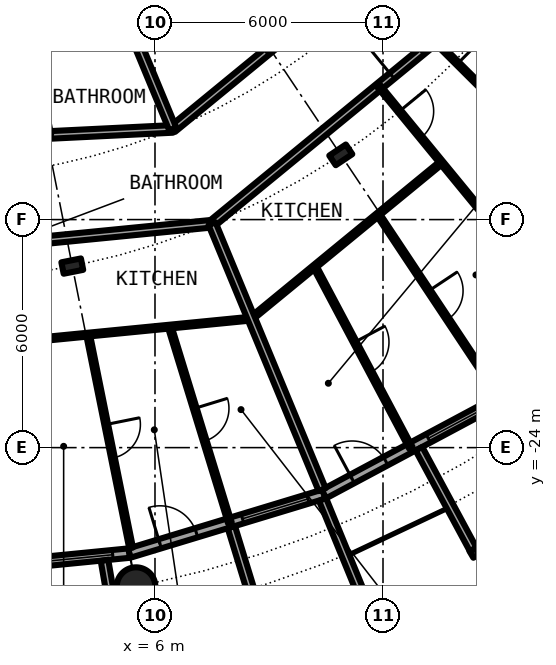
"""IFC4 building model, lengths in metres.
Left out: names, types, materials, properties, quantities, classifications, styles, units other than length and angle.
Written with IfcOpenShell. Run it as: python <this file> out.ifc"""

import sys

from ifc_helpers import new_model, si_unit, direction, frame, frame_2d, origin, origin_2d, place, context, subcontext, project, spatial, rectangle, circle, hollow_circle, i_section, extrude, element, fill, save


model = new_model("IFC4")
c1 = context("Model", 3, precision=1e-05, world=origin(), true_north=direction((0.0, 1.0)))
c2 = subcontext(c1, "Body", "Model", "MODEL_VIEW")
j1 = project(units=[si_unit("LENGTHUNIT", "METRE"), si_unit("PLANEANGLEUNIT", "RADIAN")], contexts=[c1])
p1 = place(None, origin())
s1 = spatial("IfcSite", under=j1, at=p1, CompositionType="ELEMENT")
p2 = place(p1, origin())
s2 = spatial("IfcBuilding", under=s1, at=p2, CompositionType="ELEMENT")
p3 = place(p2, frame((0.0, 0.0, 63.6)))
s3 = spatial("IfcBuildingStorey", under=s2, at=p3, CompositionType="ELEMENT", Elevation=63.6)
p4 = place(p3, frame((5.501, -27.658, 0.0), z_axis=(0.0, 0.0, 1.0), x_axis=(1.0, 0.0, 0.0)))
e1 = element("IfcColumn", 1, at=p4, inside=s3, PredefinedType="COLUMN", context=c2, shape_type="SweptSolid", body=[
    extrude(hollow_circle(Radius=0.508, WallThickness=0.04, at=origin_2d()), origin(), (0.0, 0.0, 1.0), 3.05),
])
for number, where, z_axis, x_axis in (
    (2, (3.824, -19.223, 0.0), (0.0, 0.0, 1.0), (0.195, -0.981, 0.0)),
    (3, (10.889, -16.297, 0.0), (0.0, 0.0, 1.0), (0.556, -0.831, 0.0)),
):
    element("IfcColumn", number, at=place(p3, frame(where, z_axis=z_axis, x_axis=x_axis)), inside=s3, PredefinedType="COLUMN", context=c2, shape_type="SweptSolid", body=[
        extrude(i_section(OverallWidth=0.306, OverallDepth=0.524, WebThickness=0.021, FlangeThickness=0.04, FilletRadius=0.027, at=origin_2d()), origin(), (0.0, 0.0, 1.0), 3.05),
    ])
p5 = place(p3, frame((0.0, -27.3, 0.0), z_axis=(0.0, 0.0, 1.0), x_axis=(0.995173996315, 0.098126026407, 0.0)))
e4 = element("IfcWall", 4, at=p5, inside=s3, PredefinedType="SOLIDWALL", context=c2, shape_type="SweptSolid", body=[
    extrude(rectangle(XDim=5.352, YDim=0.25, at=frame_2d((2.676, 0.0))), origin(), (0.0, 0.0, 1.0), 2.7),
])
p6 = place(p5, frame((0.841, 0.0, 0.0)))
e5 = element("IfcOpeningElement", 5, at=p6, cuts=e4, PredefinedType="OPENING", context=c2, shape_type="SweptSolid", body=[
    extrude(rectangle(XDim=1.0, YDim=2.2, at=frame_2d((0.5, 1.1))), frame((0.0, 0.135, 0.0), z_axis=(0.0, -1.0, 0.0), x_axis=(1.0, 0.0, 0.0)), (0.0, 0.0, 1.0), 0.27),
])
p7 = place(p5, frame((3.111, 0.0, 0.3)))
e6 = element("IfcOpeningElement", 6, at=p7, cuts=e4, PredefinedType="OPENING", context=c2, shape_type="SweptSolid", body=[
    extrude(rectangle(XDim=1.8, YDim=2.1, at=frame_2d((0.9, 1.05))), frame((0.0, 0.135, 0.0), z_axis=(0.0, -1.0, 0.0), x_axis=(1.0, 0.0, 0.0)), (0.0, 0.0, 1.0), 0.27),
])
p8 = place(p3, frame((4.671, -26.966, -0.03), z_axis=(0.0, 0.0, 1.0), x_axis=(0.170539878907, -0.985350774954, 0.0)))
e7 = element("IfcWall", 7, at=p8, inside=s3, PredefinedType="SOLIDWALL", context=c2, shape_type="SweptSolid", body=[
    extrude(rectangle(XDim=2.932, YDim=0.2, at=frame_2d((1.466, 0.0))), origin(), (0.0, 0.0, 1.0), 2.73),
])
p9 = place(p3, frame((5.326, -26.775, 0.0), z_axis=(0.0, 0.0, 1.0), x_axis=(0.956965678721, 0.290201119486, 0.0)))
e8 = element("IfcWall", 8, at=p9, inside=s3, PredefinedType="SOLIDWALL", context=c2, shape_type="SweptSolid", body=[
    extrude(rectangle(XDim=5.351, YDim=0.25, at=frame_2d((2.676, 0.0))), origin(), (0.0, 0.0, 1.0), 2.7),
])
p10 = place(p9, frame((0.841, 0.0, 0.0)))
e9 = element("IfcOpeningElement", 9, at=p10, cuts=e8, PredefinedType="OPENING", context=c2, shape_type="SweptSolid", body=[
    extrude(rectangle(XDim=1.0, YDim=2.2, at=frame_2d((0.5, 1.1))), frame((0.0, 0.135, 0.0), z_axis=(0.0, -1.0, 0.0), x_axis=(1.0, 0.0, 0.0)), (0.0, 0.0, 1.0), 0.27),
])
p11 = place(p9, frame((3.111, 0.0, 0.3)))
e10 = element("IfcOpeningElement", 10, at=p11, cuts=e8, PredefinedType="OPENING", context=c2, shape_type="SweptSolid", body=[
    extrude(rectangle(XDim=1.8, YDim=2.1, at=frame_2d((0.9, 1.05))), frame((0.0, 0.135, 0.0), z_axis=(0.0, -1.0, 0.0), x_axis=(1.0, 0.0, 0.0)), (0.0, 0.0, 1.0), 0.27),
])
p12 = place(p3, frame((8.009, -26.092, -0.03), z_axis=(0.0, 0.0, 1.0), x_axis=(0.293406695073, -0.955987715029, 0.0)))
e11 = element("IfcWall", 11, at=p12, inside=s3, PredefinedType="SOLIDWALL", context=c2, shape_type="SweptSolid", body=[
    extrude(rectangle(XDim=3.006, YDim=0.2, at=frame_2d((1.503, 0.0))), origin(), (0.0, 0.0, 1.0), 2.73),
])
p13 = place(p3, frame((10.409, -25.364, -0.03), z_axis=(0.0, 0.0, 1.0), x_axis=(0.379509886562, -0.925187681501, 0.0)))
e12 = element("IfcWall", 12, at=p13, inside=s3, PredefinedType="SOLIDWALL", context=c2, shape_type="SweptSolid", body=[
    extrude(rectangle(XDim=2.883, YDim=0.2, at=frame_2d((1.441, 0.0))), origin(), (0.0, 0.0, 1.0), 2.73),
])
p14 = place(p3, frame((10.447, -25.222, 0.0), z_axis=(0.0, 0.0, 1.0), x_axis=(0.881915646801, 0.471407246368, 0.0)))
e13 = element("IfcWall", 13, at=p14, inside=s3, PredefinedType="SOLIDWALL", context=c2, shape_type="SweptSolid", body=[
    extrude(rectangle(XDim=5.352, YDim=0.25, at=frame_2d((2.676, 0.0))), origin(), (0.0, 0.0, 1.0), 2.7),
])
p15 = place(p14, frame((0.841, 0.0, 0.0)))
e14 = element("IfcOpeningElement", 14, at=p15, cuts=e13, PredefinedType="OPENING", context=c2, shape_type="SweptSolid", body=[
    extrude(rectangle(XDim=1.0, YDim=2.2, at=frame_2d((0.5, 1.1))), frame((0.0, 0.135, 0.0), z_axis=(0.0, -1.0, 0.0), x_axis=(1.0, 0.0, 0.0)), (0.0, 0.0, 1.0), 0.27),
])
p16 = place(p14, frame((3.111, 0.0, 0.3)))
e15 = element("IfcOpeningElement", 15, at=p16, cuts=e13, PredefinedType="OPENING", context=c2, shape_type="SweptSolid", body=[
    extrude(rectangle(XDim=1.8, YDim=2.1, at=frame_2d((0.9, 1.05))), frame((0.0, 0.135, 0.0), z_axis=(0.0, -1.0, 0.0), x_axis=(1.0, 0.0, 0.0)), (0.0, 0.0, 1.0), 0.27),
])
p17 = place(p3, frame((14.327, -26.812, -0.03), z_axis=(0.0, 0.0, 1.0), x_axis=(0.863346521872, 0.504611517081, 0.0)))
e16 = element("IfcWall", 16, at=p17, inside=s3, PredefinedType="SOLIDWALL", context=c2, shape_type="SweptSolid", body=[
    extrude(rectangle(XDim=2.336, YDim=0.2, at=frame_2d((1.168, 0.0))), origin(), (0.0, 0.0, 1.0), 2.73),
])
p18 = place(p17, frame((0.128, 0.0, 0.33)))
e17 = element("IfcOpeningElement", 17, at=p18, cuts=e16, PredefinedType="OPENING", context=c2, shape_type="SweptSolid", body=[
    extrude(circle(Radius=1.04, at=frame_2d((1.04, 1.04))), frame((0.0, 0.11, 0.0), z_axis=(0.0, -1.0, 0.0), x_axis=(1.0, 0.0, 0.0)), (0.0, 0.0, 1.0), 0.22),
])
p19 = place(p3, frame((12.945, -24.029, -0.03), z_axis=(0.0, 0.0, 1.0), x_axis=(0.474424310775, -0.88029629861, 0.0)))
e18 = element("IfcWall", 18, at=p19, inside=s3, PredefinedType="SOLIDWALL", context=c2, shape_type="SweptSolid", body=[
    extrude(rectangle(XDim=3.006, YDim=0.2, at=frame_2d((1.503, 0.0))), origin(), (0.0, 0.0, 1.0), 2.73),
])
p20 = place(p3, frame((2.089, -21.238, 0.0), z_axis=(0.0, 0.0, 1.0), x_axis=(0.995211787668, 0.097741995509, 0.0)))
e19 = element("IfcWall", 19, at=p20, inside=s3, PredefinedType="PARTITIONING", context=c2, shape_type="SweptSolid", body=[
    extrude(rectangle(XDim=6.477, YDim=0.1, at=frame_2d((3.238, 0.0))), origin(), (0.0, 0.0, 1.0), 2.7),
])
p21 = place(p3, frame((8.534, -20.603, 0.0), z_axis=(0.0, 0.0, 1.0), x_axis=(0.773000340237, 0.634405606843, 0.0)))
e20 = element("IfcWall", 20, at=p21, inside=s3, PredefinedType="PARTITIONING", context=c2, shape_type="SweptSolid", body=[
    extrude(rectangle(XDim=6.474, YDim=0.1, at=frame_2d((3.237, 0.0))), origin(), (0.0, 0.0, 1.0), 2.7),
])
p22 = place(p3, frame((-3.665, -19.207, 0.0), z_axis=(0.0, 0.0, 1.0), x_axis=(0.995190249661, 0.097961048277, 0.0)))
e21 = element("IfcWall", 21, at=p22, inside=s3, PredefinedType="PARTITIONING", context=c2, shape_type="SweptSolid", body=[
    extrude(rectangle(XDim=11.22, YDim=0.2, at=frame_2d((5.61, 0.0))), origin(), (0.0, 0.0, 1.0), 2.38),
])
p23 = place(p22, frame((4.08, 0.0, 0.0)))
e22 = element("IfcOpeningElement", 22, at=p23, cuts=e21, PredefinedType="OPENING", context=c2, shape_type="SweptSolid", body=[
    extrude(rectangle(XDim=1.0, YDim=2.3, at=frame_2d((0.5, 1.15))), frame((0.0, 0.11, 0.0), z_axis=(0.0, -1.0, 0.0), x_axis=(1.0, 0.0, 0.0)), (0.0, 0.0, 1.0), 0.22),
])
p24 = place(p3, frame((7.498, -18.109, 0.0), z_axis=(0.0, 0.0, 1.0), x_axis=(0.773076379635, 0.634312944256, 0.0)))
e23 = element("IfcWall", 23, at=p24, inside=s3, PredefinedType="PARTITIONING", context=c2, shape_type="SweptSolid", body=[
    extrude(rectangle(XDim=11.221, YDim=0.2, at=frame_2d((5.611, 0.0))), origin(), (0.0, 0.0, 1.0), 2.38),
])
p25 = place(p24, frame((6.132, 0.0, 0.0)))
e24 = element("IfcOpeningElement", 24, at=p25, cuts=e23, PredefinedType="OPENING", context=c2, shape_type="SweptSolid", body=[
    extrude(rectangle(XDim=1.0, YDim=2.3, at=frame_2d((0.5, 1.15))), frame((0.0, 0.11, 0.0), z_axis=(0.0, -1.0, 0.0), x_axis=(1.0, 0.0, 0.0)), (0.0, 0.0, 1.0), 0.22),
])
p26 = place(p3, frame((6.467, -15.614, 0.0), z_axis=(0.0, 0.0, 1.0), x_axis=(0.773074935257, 0.634314704605, 0.0)))
e25 = element("IfcWall", 25, at=p26, inside=s3, PredefinedType="PARTITIONING", context=c2, shape_type="SweptSolid", body=[
    extrude(rectangle(XDim=9.809, YDim=0.2, at=frame_2d((4.904, 0.0))), origin(), (0.0, 0.0, 1.0), 2.7),
])
p27 = place(p26, frame((4.407, 0.0, 0.0)))
e26 = element("IfcOpeningElement", 26, at=p27, cuts=e25, PredefinedType="OPENING", context=c2, shape_type="SweptSolid", body=[
    extrude(rectangle(XDim=1.0, YDim=2.3, at=frame_2d((0.5, 1.15))), frame((0.0, 0.11, 0.0), z_axis=(0.0, -1.0, 0.0), x_axis=(1.0, 0.0, 0.0)), (0.0, 0.0, 1.0), 0.22),
])
p28 = place(p3, frame((-4.909, -16.172, 0.0), z_axis=(0.0, 0.0, 1.0), x_axis=(0.99879913765, 0.048992679355, 0.0)))
e27 = element("IfcWall", 27, at=p28, inside=s3, PredefinedType="PARTITIONING", context=c2, shape_type="SweptSolid", body=[
    extrude(rectangle(XDim=11.392, YDim=0.2, at=frame_2d((5.696, 0.0))), origin(), (0.0, 0.0, 1.0), 2.7),
])
p29 = place(p28, frame((6.011, 0.0, 0.0)))
e28 = element("IfcOpeningElement", 28, at=p29, cuts=e27, PredefinedType="OPENING", context=c2, shape_type="SweptSolid", body=[
    extrude(rectangle(XDim=1.0, YDim=2.3, at=frame_2d((0.5, 1.15))), frame((0.0, 0.11, 0.0), z_axis=(0.0, -1.0, 0.0), x_axis=(1.0, 0.0, 0.0)), (0.0, 0.0, 1.0), 0.22),
])
p30 = place(p3, frame((2.954, -7.132, 0.0), z_axis=(0.0, 0.0, 1.0), x_axis=(0.382646942224, -0.923894646378, 0.0)))
e29 = element("IfcWall", 29, at=p30, inside=s3, PredefinedType="PARTITIONING", context=c2, shape_type="SweptSolid", body=[
    extrude(rectangle(XDim=9.181, YDim=0.2, at=frame_2d((4.59, 0.0))), origin(), (0.0, 0.0, 1.0), 2.7),
])
p31 = place(p3, frame((4.239, -21.026, 0.0), z_axis=(0.0, 0.0, 1.0), x_axis=(0.197706555414, -0.980261249844, 0.0)))
e30 = element("IfcWall", 30, at=p31, inside=s3, PredefinedType="PARTITIONING", context=c2, shape_type="SweptSolid", body=[
    extrude(rectangle(XDim=5.726, YDim=0.1, at=frame_2d((2.863, 0.0))), origin(), (0.0, 0.0, 1.0), 2.7),
])
p32 = place(p31, frame((2.413, 0.0, 0.0)))
e31 = element("IfcOpeningElement", 31, at=p32, cuts=e30, PredefinedType="OPENING", context=c2, shape_type="SweptSolid", body=[
    extrude(rectangle(XDim=0.9, YDim=2.3, at=frame_2d((0.45, 1.15))), frame((0.0, 0.06, 0.0), z_axis=(0.0, -1.0, 0.0), x_axis=(1.0, 0.0, 0.0)), (0.0, 0.0, 1.0), 0.12),
])
p33 = place(p3, frame((6.386, -20.814, 0.0), z_axis=(0.0, 0.0, 1.0), x_axis=(0.293311091719, -0.956017051874, 0.0)))
e32 = element("IfcWall", 32, at=p33, inside=s3, PredefinedType="PARTITIONING", context=c2, shape_type="SweptSolid", body=[
    extrude(rectangle(XDim=5.404, YDim=0.1, at=frame_2d((2.702, 0.0))), origin(), (0.0, 0.0, 1.0), 2.7),
])
p34 = place(p33, frame((2.252, 0.0, 0.0)))
e33 = element("IfcOpeningElement", 33, at=p34, cuts=e32, PredefinedType="OPENING", context=c2, shape_type="SweptSolid", body=[
    extrude(rectangle(XDim=0.9, YDim=2.3, at=frame_2d((0.45, 1.15))), frame((0.0, 0.06, 0.0), z_axis=(0.0, -1.0, 0.0), x_axis=(1.0, 0.0, 0.0)), (0.0, 0.0, 1.0), 0.12),
])
p35 = place(p3, frame((7.501, -18.108, 0.0), z_axis=(0.0, 0.0, 1.0), x_axis=(0.382600411313, -0.923913916587, 0.0)))
e34 = element("IfcWall", 34, at=p35, inside=s3, PredefinedType="PARTITIONING", context=c2, shape_type="SweptSolid", body=[
    extrude(rectangle(XDim=7.574, YDim=0.2, at=frame_2d((3.787, 0.0))), origin(), (0.0, 0.0, 1.0), 2.7),
])
p36 = place(p3, frame((10.202, -19.234, 0.0), z_axis=(0.0, 0.0, 1.0), x_axis=(0.468610030042, -0.883405139075, 0.0)))
e35 = element("IfcWall", 35, at=p36, inside=s3, PredefinedType="PARTITIONING", context=c2, shape_type="SweptSolid", body=[
    extrude(rectangle(XDim=5.403, YDim=0.1, at=frame_2d((2.702, 0.0))), origin(), (0.0, 0.0, 1.0), 2.7),
])
p37 = place(p36, frame((2.252, 0.0, 0.0)))
e36 = element("IfcOpeningElement", 36, at=p37, cuts=e35, PredefinedType="OPENING", context=c2, shape_type="SweptSolid", body=[
    extrude(rectangle(XDim=0.9, YDim=2.3, at=frame_2d((0.45, 1.15))), frame((0.0, 0.06, 0.0), z_axis=(0.0, -1.0, 0.0), x_axis=(1.0, 0.0, 0.0)), (0.0, 0.0, 1.0), 0.12),
])
p38 = place(p3, frame((11.871, -17.864, 0.0), z_axis=(0.0, 0.0, 1.0), x_axis=(0.553637025191, -0.83275809473, 0.0)))
e37 = element("IfcWall", 37, at=p38, inside=s3, PredefinedType="PARTITIONING", context=c2, shape_type="SweptSolid", body=[
    extrude(rectangle(XDim=5.726, YDim=0.1, at=frame_2d((2.863, 0.0))), origin(), (0.0, 0.0, 1.0), 2.7),
])
p39 = place(p38, frame((2.413, 0.0, 0.0)))
e38 = element("IfcOpeningElement", 38, at=p39, cuts=e37, PredefinedType="OPENING", context=c2, shape_type="SweptSolid", body=[
    extrude(rectangle(XDim=0.9, YDim=2.3, at=frame_2d((0.45, 1.15))), frame((0.0, 0.06, 0.0), z_axis=(0.0, -1.0, 0.0), x_axis=(1.0, 0.0, 0.0)), (0.0, 0.0, 1.0), 0.12),
])
p40 = place(p3, frame((11.899, -14.499, 0.0), z_axis=(0.0, 0.0, 1.0), x_axis=(0.634396151441, -0.77300810024, 0.0)))
e39 = element("IfcWall", 39, at=p40, inside=s3, PredefinedType="PARTITIONING", context=c2, shape_type="SweptSolid", body=[
    extrude(rectangle(XDim=8.419, YDim=0.1, at=frame_2d((4.209, 0.0))), origin(), (0.0, 0.0, 1.0), 2.7),
])
p41 = place(p40, frame((0.842, 0.0, 0.0)))
e40 = element("IfcOpeningElement", 40, at=p41, cuts=e39, PredefinedType="OPENING", context=c2, shape_type="SweptSolid", body=[
    extrude(rectangle(XDim=0.9, YDim=2.3, at=frame_2d((0.45, 1.15))), frame((0.0, 0.06, 0.0), z_axis=(0.0, -1.0, 0.0), x_axis=(1.0, 0.0, 0.0)), (0.0, 0.0, 1.0), 0.12),
])
p42 = place(p40, frame((5.051, 0.0, 0.0)))
e41 = element("IfcOpeningElement", 41, at=p42, cuts=e39, PredefinedType="OPENING", context=c2, shape_type="SweptSolid", body=[
    extrude(rectangle(XDim=0.9, YDim=2.3, at=frame_2d((0.45, 1.15))), frame((0.0, 0.06, 0.0), z_axis=(0.0, -1.0, 0.0), x_axis=(1.0, 0.0, 0.0)), (0.0, 0.0, 1.0), 0.12),
])
p43 = place(p3, frame((13.365, -13.296, 0.0), z_axis=(0.0, 0.0, 1.0), x_axis=(0.708843617398, -0.705365668341, 0.0)))
e42 = element("IfcWall", 42, at=p43, inside=s3, PredefinedType="PARTITIONING", context=c2, shape_type="SweptSolid", body=[
    extrude(rectangle(XDim=2.597, YDim=0.1, at=frame_2d((1.299, 0.0))), origin(), (0.0, 0.0, 1.0), 2.7),
])
p44 = place(p43, frame((0.848, 0.0, 0.0)))
e43 = element("IfcOpeningElement", 43, at=p44, cuts=e42, PredefinedType="OPENING", context=c2, shape_type="SweptSolid", body=[
    extrude(rectangle(XDim=0.9, YDim=2.3, at=frame_2d((0.45, 1.15))), frame((0.0, 0.06, 0.0), z_axis=(0.0, -1.0, 0.0), x_axis=(1.0, 0.0, 0.0)), (0.0, 0.0, 1.0), 0.12),
])
p45 = place(p7, origin())
e44 = element("IfcWindow", 44, at=p45, inside=s3, PartitioningType="SINGLE_PANEL", PredefinedType="WINDOW", context=c2, shape_type="SweptSolid", body=[
    extrude(rectangle(XDim=1.8, YDim=2.1, at=frame_2d((0.9, 1.05))), frame((0.0, 0.03, 0.0), z_axis=(0.0, -1.0, 0.0), x_axis=(1.0, 0.0, 0.0)), (0.0, 0.0, 1.0), 0.06),
])
fill(e6, e44)
p46 = place(p10, origin())
e45 = element("IfcDoor", 45, at=p46, inside=s3, OperationType="SINGLE_SWING_LEFT", PredefinedType="DOOR", context=c2, shape_type="SweptSolid", body=[
    extrude(rectangle(XDim=1.0, YDim=2.2, at=frame_2d((0.5, 1.1))), frame((0.0, 0.025, 0.0), z_axis=(0.0, -1.0, 0.0), x_axis=(1.0, 0.0, 0.0)), (0.0, 0.0, 1.0), 0.05),
])
fill(e9, e45)
p47 = place(p11, origin())
e46 = element("IfcWindow", 46, at=p47, inside=s3, PartitioningType="SINGLE_PANEL", PredefinedType="WINDOW", context=c2, shape_type="SweptSolid", body=[
    extrude(rectangle(XDim=1.8, YDim=2.1, at=frame_2d((0.9, 1.05))), frame((0.0, 0.03, 0.0), z_axis=(0.0, -1.0, 0.0), x_axis=(1.0, 0.0, 0.0)), (0.0, 0.0, 1.0), 0.06),
])
fill(e10, e46)
p48 = place(p15, origin())
e47 = element("IfcDoor", 47, at=p48, inside=s3, OperationType="SINGLE_SWING_LEFT", PredefinedType="DOOR", context=c2, shape_type="SweptSolid", body=[
    extrude(rectangle(XDim=1.0, YDim=2.2, at=frame_2d((0.5, 1.1))), frame((0.0, 0.025, 0.0), z_axis=(0.0, -1.0, 0.0), x_axis=(1.0, 0.0, 0.0)), (0.0, 0.0, 1.0), 0.05),
])
fill(e14, e47)
p49 = place(p16, origin())
e48 = element("IfcWindow", 48, at=p49, inside=s3, PartitioningType="SINGLE_PANEL", PredefinedType="WINDOW", context=c2, shape_type="SweptSolid", body=[
    extrude(rectangle(XDim=1.8, YDim=2.1, at=frame_2d((0.9, 1.05))), frame((0.0, 0.03, 0.0), z_axis=(0.0, -1.0, 0.0), x_axis=(1.0, 0.0, 0.0)), (0.0, 0.0, 1.0), 0.06),
])
fill(e15, e48)
p50 = place(p18, origin())
e49 = element("IfcWindow", 49, at=p50, inside=s3, PartitioningType="SINGLE_PANEL", PredefinedType="WINDOW", context=c2, shape_type="SweptSolid", body=[
    extrude(circle(Radius=1.04, at=frame_2d((1.04, 1.04))), frame((0.0, 0.03, 0.0), z_axis=(0.0, -1.0, 0.0), x_axis=(1.0, 0.0, 0.0)), (0.0, 0.0, 1.0), 0.06),
])
fill(e17, e49)
p51 = place(p32, origin())
e50 = element("IfcDoor", 50, at=p51, inside=s3, OperationType="SINGLE_SWING_RIGHT", PredefinedType="DOOR", context=c2, shape_type="SweptSolid", body=[
    extrude(rectangle(XDim=0.9, YDim=2.3, at=frame_2d((0.45, 1.15))), frame((0.0, 0.025, 0.0), z_axis=(0.0, -1.0, 0.0), x_axis=(1.0, 0.0, 0.0)), (0.0, 0.0, 1.0), 0.05),
])
fill(e31, e50)
p52 = place(p34, origin())
e51 = element("IfcDoor", 51, at=p52, inside=s3, OperationType="SINGLE_SWING_RIGHT", PredefinedType="DOOR", context=c2, shape_type="SweptSolid", body=[
    extrude(rectangle(XDim=0.9, YDim=2.3, at=frame_2d((0.45, 1.15))), frame((0.0, 0.025, 0.0), z_axis=(0.0, -1.0, 0.0), x_axis=(1.0, 0.0, 0.0)), (0.0, 0.0, 1.0), 0.05),
])
fill(e33, e51)
p53 = place(p25, origin())
e52 = element("IfcDoor", 52, at=p53, inside=s3, OperationType="SINGLE_SWING_RIGHT", PredefinedType="DOOR", context=c2, shape_type="SweptSolid", body=[
    extrude(rectangle(XDim=1.0, YDim=2.3, at=frame_2d((0.5, 1.15))), frame((0.0, 0.025, 0.0), z_axis=(0.0, -1.0, 0.0), x_axis=(1.0, 0.0, 0.0)), (0.0, 0.0, 1.0), 0.05),
])
fill(e24, e52)
p54 = place(p44, origin())
e53 = element("IfcDoor", 53, at=p54, inside=s3, OperationType="SINGLE_SWING_LEFT", PredefinedType="DOOR", context=c2, shape_type="SweptSolid", body=[
    extrude(rectangle(XDim=0.9, YDim=2.3, at=frame_2d((0.45, 1.15))), frame((0.0, 0.025, 0.0), z_axis=(0.0, -1.0, 0.0), x_axis=(1.0, 0.0, 0.0)), (0.0, 0.0, 1.0), 0.05),
])
fill(e43, e53)
p55 = place(p41, origin())
e54 = element("IfcDoor", 54, at=p55, inside=s3, OperationType="SINGLE_SWING_LEFT", PredefinedType="DOOR", context=c2, shape_type="SweptSolid", body=[
    extrude(rectangle(XDim=0.9, YDim=2.3, at=frame_2d((0.45, 1.15))), frame((0.0, 0.025, 0.0), z_axis=(0.0, -1.0, 0.0), x_axis=(1.0, 0.0, 0.0)), (0.0, 0.0, 1.0), 0.05),
])
fill(e40, e54)
p56 = place(p39, origin())
e55 = element("IfcDoor", 55, at=p56, inside=s3, OperationType="SINGLE_SWING_RIGHT", PredefinedType="DOOR", context=c2, shape_type="SweptSolid", body=[
    extrude(rectangle(XDim=0.9, YDim=2.3, at=frame_2d((0.45, 1.15))), frame((0.0, 0.025, 0.0), z_axis=(0.0, -1.0, 0.0), x_axis=(1.0, 0.0, 0.0)), (0.0, 0.0, 1.0), 0.05),
])
fill(e38, e55)
p57 = place(p37, origin())
e56 = element("IfcDoor", 56, at=p57, inside=s3, OperationType="SINGLE_SWING_RIGHT", PredefinedType="DOOR", context=c2, shape_type="SweptSolid", body=[
    extrude(rectangle(XDim=0.9, YDim=2.3, at=frame_2d((0.45, 1.15))), frame((0.0, 0.025, 0.0), z_axis=(0.0, -1.0, 0.0), x_axis=(1.0, 0.0, 0.0)), (0.0, 0.0, 1.0), 0.05),
])
fill(e36, e56)
save(model, sys.argv[1])
